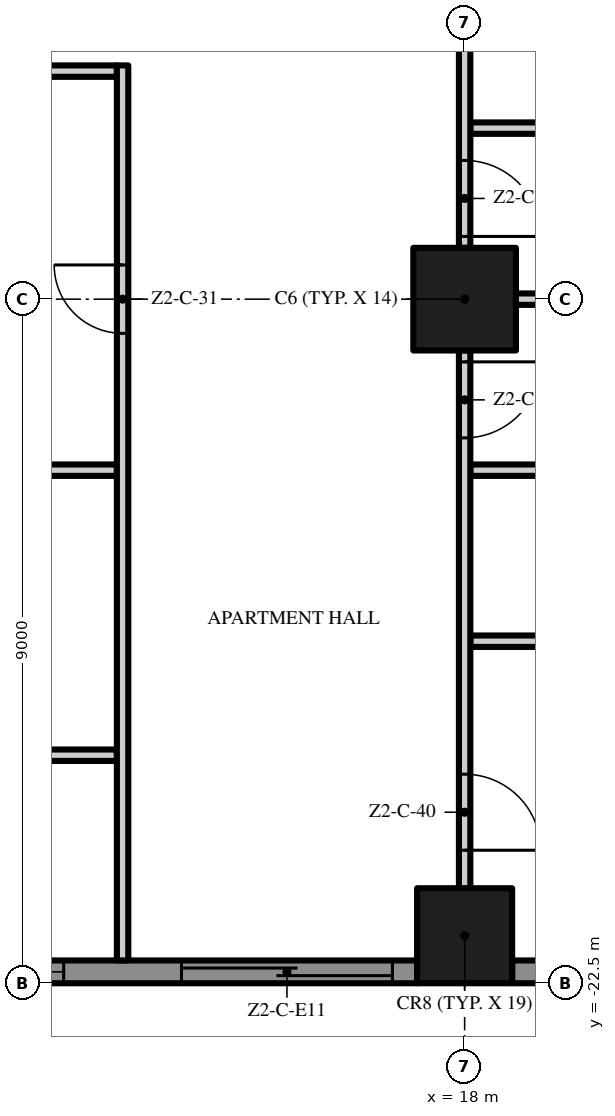
"""IFC4 building model, lengths in metres.
Left out: names, types, materials, properties, quantities, classifications, styles, units other than length and angle.
Written with IfcOpenShell. Run it as: python <this file> out.ifc"""

import sys

from ifc_helpers import new_model, si_unit, direction, frame, frame_2d, origin, origin_2d, place, context, subcontext, project, spatial, polyline, rectangle, outline, extrude, element, fill, save


model = new_model("IFC4")
c1 = context("Model", 3, precision=1e-05, world=origin(), true_north=direction((0.0, 1.0)))
c2 = subcontext(c1, "Body", "Model", "MODEL_VIEW")
j1 = project(units=[si_unit("LENGTHUNIT", "METRE"), si_unit("PLANEANGLEUNIT", "RADIAN")], contexts=[c1])
p1 = place(None, origin())
s1 = spatial("IfcSite", under=j1, at=p1, CompositionType="ELEMENT")
p2 = place(p1, origin())
s2 = spatial("IfcBuilding", under=s1, at=p2, CompositionType="ELEMENT")
p3 = place(p2, frame((0.0, 0.0, 99.8)))
s3 = spatial("IfcBuildingStorey", under=s2, at=p3, CompositionType="ELEMENT", Elevation=99.8)
p4 = place(p3, frame((18.0, -13.5, 0.0), z_axis=(0.0, 0.0, 1.0), x_axis=(1.0, 0.0, 0.0)))
e1 = element("IfcColumn", 1, at=p4, inside=s3, PredefinedType="COLUMN", context=c2, shape_type="SweptSolid", body=[
    extrude(rectangle(XDim=1.35, YDim=1.35, at=origin_2d()), origin(), (0.0, 0.0, 1.0), 3.5),
])
p5 = place(p3, frame((18.0, -21.875, 0.0), z_axis=(0.0, 0.0, 1.0), x_axis=(1.0, 0.0, 0.0)))
e2 = element("IfcColumn", 2, at=p5, inside=s3, PredefinedType="COLUMN", context=c2, shape_type="SweptSolid", body=[
    extrude(rectangle(XDim=1.25, YDim=1.25, at=origin_2d()), origin(), (0.0, 0.0, 1.0), 3.5),
])
p6 = place(p3, frame((17.375, -22.35, 0.0), z_axis=(0.0, 0.0, 1.0), x_axis=(-1.0, 0.0, 0.0)))
e3 = element("IfcWall", 3, at=p6, inside=s3, PredefinedType="SOLIDWALL", context=c2, shape_type="SweptSolid", body=[
    extrude(rectangle(XDim=7.75, YDim=0.3, at=frame_2d((3.875, 0.0))), origin(), (0.0, 0.0, 1.0), 3.5),
])
p7 = place(p6, frame((4.65, 0.0, 0.45)))
e4 = element("IfcOpeningElement", 4, at=p7, cuts=e3, PredefinedType="OPENING", context=c2, shape_type="SweptSolid", body=[
    extrude(rectangle(XDim=2.775, YDim=2.65, at=frame_2d((1.387, 1.325))), frame((0.0, 0.16, 0.0), z_axis=(0.0, -1.0, 0.0), x_axis=(1.0, 0.0, 0.0)), (0.0, 0.0, 1.0), 0.32),
])
p8 = place(p6, frame((0.325, 0.0, 0.0)))
e5 = element("IfcOpeningElement", 5, at=p8, cuts=e3, PredefinedType="OPENING", context=c2, shape_type="SweptSolid", body=[
    extrude(rectangle(XDim=2.775, YDim=2.4, at=frame_2d((1.387, 1.2))), frame((0.0, 0.16, 0.0), z_axis=(0.0, -1.0, 0.0), x_axis=(1.0, 0.0, 0.0)), (0.0, 0.0, 1.0), 0.32),
])
p9 = place(p3, frame((22.5, -22.35, 0.0), z_axis=(0.0, 0.0, 1.0), x_axis=(-1.0, 0.0, 0.0)))
e6 = element("IfcWall", 6, at=p9, inside=s3, PredefinedType="SOLIDWALL", context=c2, shape_type="SweptSolid", body=[
    extrude(rectangle(XDim=3.875, YDim=0.3, at=frame_2d((1.938, 0.0))), origin(), (0.0, 0.0, 1.0), 3.5),
])
p10 = place(p9, frame((0.775, 0.0, 0.45)))
e7 = element("IfcOpeningElement", 7, at=p10, cuts=e6, PredefinedType="OPENING", context=c2, shape_type="SweptSolid", body=[
    extrude(rectangle(XDim=2.775, YDim=2.65, at=frame_2d((1.387, 1.325))), frame((0.0, 0.16, 0.0), z_axis=(0.0, -1.0, 0.0), x_axis=(1.0, 0.0, 0.0)), (0.0, 0.0, 1.0), 0.32),
])
p11 = place(p3, origin())
e8 = element("IfcWall", 8, at=p11, inside=s3, PredefinedType="USERDEFINED", context=c2, shape_type="SweptSolid", body=[
    extrude(outline(polyline([(-22.5, -23.1), (-21.0, -23.329), (-19.5, -23.929), (-18.0, -24.671), (-16.5, -25.271), (-15.0, -25.5), (-13.5, -25.271), (-12.0, -24.671), (-10.5, -23.929), (-9.0, -23.329), (-7.5, -23.1), (-6.0, -23.329), (-4.5, -23.929), (-3.0, -24.671), (-1.5, -25.271), (0.0, -25.5), (1.5, -25.271), (3.0, -24.671), (4.5, -23.929), (6.0, -23.329), (7.5, -23.1), (9.0, -23.329), (10.5, -23.929), (12.0, -24.671), (13.5, -25.271), (15.0, -25.5), (16.5, -25.271), (18.0, -24.671), (19.5, -23.929), (21.0, -23.329), (22.5, -23.1), (22.462, -22.853), (20.934, -23.086), (19.398, -23.701), (17.898, -24.442), (16.434, -25.028), (15.0, -25.247), (13.566, -25.028), (12.102, -24.442), (10.602, -23.701), (9.066, -23.086), (7.5, -22.847), (5.934, -23.086), (4.398, -23.701), (2.898, -24.442), (1.434, -25.028), (0.0, -25.247), (-1.434, -25.028), (-2.898, -24.442), (-4.398, -23.701), (-5.934, -23.086), (-7.5, -22.847), (-9.066, -23.086), (-10.602, -23.701), (-12.102, -24.442), (-13.566, -25.028), (-15.0, -25.247), (-16.434, -25.028), (-17.898, -24.442), (-19.398, -23.701), (-20.934, -23.086), (-22.462, -22.853), (-22.5, -23.1)])), origin(), (0.0, 0.0, 1.0), 0.9),
])
p12 = place(p3, frame((9.075, -19.5, 0.0), z_axis=(0.0, 0.0, 1.0), x_axis=(1.0, 0.0, 0.0)))
e9 = element("IfcWall", 9, at=p12, inside=s3, PredefinedType="PARTITIONING", context=c2, shape_type="SweptSolid", body=[
    extrude(rectangle(XDim=4.35, YDim=0.15, at=frame_2d((2.175, 0.0))), origin(), (0.0, 0.0, 1.0), 3.5),
])
p13 = place(p3, frame((18.075, -18.0, 0.0), z_axis=(0.0, 0.0, 1.0), x_axis=(1.0, 0.0, 0.0)))
e10 = element("IfcWall", 10, at=p13, inside=s3, PredefinedType="PARTITIONING", context=c2, shape_type="SweptSolid", body=[
    extrude(rectangle(XDim=3.8, YDim=0.15, at=frame_2d((1.9, 0.0))), origin(), (0.0, 0.0, 1.0), 3.5),
])
p14 = place(p3, frame((13.425, -15.75, 0.0), z_axis=(0.0, 0.0, 1.0), x_axis=(-1.0, 0.0, 0.0)))
e11 = element("IfcWall", 11, at=p14, inside=s3, PredefinedType="PARTITIONING", context=c2, shape_type="SweptSolid", body=[
    extrude(rectangle(XDim=4.35, YDim=0.15, at=frame_2d((2.175, 0.0))), origin(), (0.0, 0.0, 1.0), 3.5),
])
p15 = place(p14, frame((1.7, 0.0, 0.0)))
e12 = element("IfcOpeningElement", 12, at=p15, cuts=e11, PredefinedType="OPENING", context=c2, shape_type="SweptSolid", body=[
    extrude(rectangle(XDim=0.9, YDim=2.1, at=frame_2d((0.45, 1.05))), frame((0.0, 0.085, 0.0), z_axis=(0.0, -1.0, 0.0), x_axis=(1.0, 0.0, 0.0)), (0.0, 0.0, 1.0), 0.17),
])
p16 = place(p3, frame((18.075, -15.75, 0.0), z_axis=(0.0, 0.0, 1.0), x_axis=(1.0, 0.0, 0.0)))
e13 = element("IfcWall", 13, at=p16, inside=s3, PredefinedType="PARTITIONING", context=c2, shape_type="SweptSolid", body=[
    extrude(rectangle(XDim=2.85, YDim=0.15, at=frame_2d((1.425, 0.0))), origin(), (0.0, 0.0, 1.0), 3.5),
])
p17 = place(p3, frame((18.675, -13.5, 0.0), z_axis=(0.0, 0.0, 1.0), x_axis=(1.0, 0.0, 0.0)))
e14 = element("IfcWall", 14, at=p17, inside=s3, PredefinedType="PARTITIONING", context=c2, shape_type="SweptSolid", body=[
    extrude(rectangle(XDim=7.075, YDim=0.15, at=frame_2d((3.538, 0.0))), origin(), (0.0, 0.0, 1.0), 3.5),
])
p18 = place(p3, frame((18.075, -11.25, 0.0), z_axis=(0.0, 0.0, 1.0), x_axis=(1.0, 0.0, 0.0)))
e15 = element("IfcWall", 15, at=p18, inside=s3, PredefinedType="PARTITIONING", context=c2, shape_type="SweptSolid", body=[
    extrude(rectangle(XDim=2.85, YDim=0.15, at=frame_2d((1.425, 0.0))), origin(), (0.0, 0.0, 1.0), 3.5),
])
p19 = place(p3, frame((9.075, -10.5, 0.0), z_axis=(0.0, 0.0, 1.0), x_axis=(1.0, 0.0, 0.0)))
e16 = element("IfcWall", 16, at=p19, inside=s3, PredefinedType="PARTITIONING", context=c2, shape_type="SweptSolid", body=[
    extrude(rectangle(XDim=4.35, YDim=0.15, at=frame_2d((2.175, 0.0))), origin(), (0.0, 0.0, 1.0), 3.5),
])
p20 = place(p3, frame((13.5, -22.2, 0.0), z_axis=(0.0, 0.0, 1.0), x_axis=(0.0, 1.0, 0.0)))
e17 = element("IfcWall", 17, at=p20, inside=s3, PredefinedType="PARTITIONING", context=c2, shape_type="SweptSolid", body=[
    extrude(rectangle(XDim=11.775, YDim=0.15, at=frame_2d((5.888, 0.0))), origin(), (0.0, 0.0, 1.0), 3.5),
])
p21 = place(p20, frame((8.25, 0.0, 0.0)))
e18 = element("IfcOpeningElement", 18, at=p21, cuts=e17, PredefinedType="OPENING", context=c2, shape_type="SweptSolid", body=[
    extrude(rectangle(XDim=0.9, YDim=2.1, at=frame_2d((0.45, 1.05))), frame((0.0, 0.085, 0.0), z_axis=(0.0, -1.0, 0.0), x_axis=(1.0, 0.0, 0.0)), (0.0, 0.0, 1.0), 0.17),
])
p22 = place(p3, frame((18.0, -14.175, 0.0), z_axis=(0.0, 0.0, 1.0), x_axis=(0.0, -1.0, 0.0)))
e19 = element("IfcWall", 19, at=p22, inside=s3, PredefinedType="PARTITIONING", context=c2, shape_type="SweptSolid", body=[
    extrude(rectangle(XDim=7.075, YDim=0.15, at=frame_2d((3.538, 0.0))), origin(), (0.0, 0.0, 1.0), 3.5),
])
p23 = place(p22, frame((0.15, 0.0, 0.0)))
e20 = element("IfcOpeningElement", 20, at=p23, cuts=e19, PredefinedType="OPENING", context=c2, shape_type="SweptSolid", body=[
    extrude(rectangle(XDim=1.0, YDim=2.4, at=frame_2d((0.5, 1.2))), frame((0.0, 0.085, 0.0), z_axis=(0.0, -1.0, 0.0), x_axis=(1.0, 0.0, 0.0)), (0.0, 0.0, 1.0), 0.17),
])
p24 = place(p22, frame((5.575, 0.0, 0.0)))
e21 = element("IfcOpeningElement", 21, at=p24, cuts=e19, PredefinedType="OPENING", context=c2, shape_type="SweptSolid", body=[
    extrude(rectangle(XDim=1.0, YDim=2.4, at=frame_2d((0.5, 1.2))), frame((0.0, 0.085, 0.0), z_axis=(0.0, -1.0, 0.0), x_axis=(1.0, 0.0, 0.0)), (0.0, 0.0, 1.0), 0.17),
])
p25 = place(p3, frame((18.0, -5.175, 0.0), z_axis=(0.0, 0.0, 1.0), x_axis=(0.0, -1.0, 0.0)))
e22 = element("IfcWall", 22, at=p25, inside=s3, PredefinedType="PARTITIONING", context=c2, shape_type="SweptSolid", body=[
    extrude(rectangle(XDim=7.65, YDim=0.15, at=frame_2d((3.825, 0.0))), origin(), (0.0, 0.0, 1.0), 3.5),
])
p26 = place(p25, frame((0.15, 0.0, 0.0)))
e23 = element("IfcOpeningElement", 23, at=p26, cuts=e22, PredefinedType="OPENING", context=c2, shape_type="SweptSolid", body=[
    extrude(rectangle(XDim=1.8, YDim=2.4, at=frame_2d((0.9, 1.2))), frame((0.0, 0.085, 0.0), z_axis=(0.0, -1.0, 0.0), x_axis=(1.0, 0.0, 0.0)), (0.0, 0.0, 1.0), 0.17),
])
p27 = place(p25, frame((6.5, 0.0, 0.0)))
e24 = element("IfcOpeningElement", 24, at=p27, cuts=e22, PredefinedType="OPENING", context=c2, shape_type="SweptSolid", body=[
    extrude(rectangle(XDim=1.0, YDim=2.4, at=frame_2d((0.5, 1.2))), frame((0.0, 0.085, 0.0), z_axis=(0.0, -1.0, 0.0), x_axis=(1.0, 0.0, 0.0)), (0.0, 0.0, 1.0), 0.17),
])
p28 = place(p7, origin())
e25 = element("IfcWindow", 25, at=p28, inside=s3, PartitioningType="SINGLE_PANEL", PredefinedType="WINDOW", context=c2, shape_type="SweptSolid", body=[
    extrude(rectangle(XDim=2.775, YDim=2.65, at=frame_2d((1.387, 1.325))), frame((0.0, 0.03, 0.0), z_axis=(0.0, -1.0, 0.0), x_axis=(1.0, 0.0, 0.0)), (0.0, 0.0, 1.0), 0.06),
])
fill(e4, e25)
p29 = place(p8, origin())
e26 = element("IfcDoor", 26, at=p29, inside=s3, OperationType="SINGLE_SWING_LEFT", PredefinedType="DOOR", context=c2, shape_type="SweptSolid", body=[
    extrude(rectangle(XDim=2.775, YDim=2.4, at=frame_2d((1.387, 1.2))), frame((0.0, 0.025, 0.0), z_axis=(0.0, -1.0, 0.0), x_axis=(1.0, 0.0, 0.0)), (0.0, 0.0, 1.0), 0.05),
])
fill(e5, e26)
p30 = place(p21, origin())
e27 = element("IfcDoor", 27, at=p30, inside=s3, OperationType="SINGLE_SWING_RIGHT", PredefinedType="DOOR", context=c2, shape_type="SweptSolid", body=[
    extrude(rectangle(XDim=0.9, YDim=2.1, at=frame_2d((0.45, 1.05))), frame((0.0, 0.025, 0.0), z_axis=(0.0, -1.0, 0.0), x_axis=(1.0, 0.0, 0.0)), (0.0, 0.0, 1.0), 0.05),
])
fill(e18, e27)
p31 = place(p27, origin())
e28 = element("IfcDoor", 28, at=p31, inside=s3, OperationType="SINGLE_SWING_RIGHT", PredefinedType="DOOR", context=c2, shape_type="SweptSolid", body=[
    extrude(rectangle(XDim=1.0, YDim=2.4, at=frame_2d((0.5, 1.2))), frame((0.0, 0.025, 0.0), z_axis=(0.0, -1.0, 0.0), x_axis=(1.0, 0.0, 0.0)), (0.0, 0.0, 1.0), 0.05),
])
fill(e24, e28)
p32 = place(p23, origin())
e29 = element("IfcDoor", 29, at=p32, inside=s3, OperationType="SINGLE_SWING_LEFT", PredefinedType="DOOR", context=c2, shape_type="SweptSolid", body=[
    extrude(rectangle(XDim=1.0, YDim=2.4, at=frame_2d((0.5, 1.2))), frame((0.0, 0.025, 0.0), z_axis=(0.0, -1.0, 0.0), x_axis=(1.0, 0.0, 0.0)), (0.0, 0.0, 1.0), 0.05),
])
fill(e20, e29)
p33 = place(p24, origin())
e30 = element("IfcDoor", 30, at=p33, inside=s3, OperationType="SINGLE_SWING_RIGHT", PredefinedType="DOOR", context=c2, shape_type="SweptSolid", body=[
    extrude(rectangle(XDim=1.0, YDim=2.4, at=frame_2d((0.5, 1.2))), frame((0.0, 0.025, 0.0), z_axis=(0.0, -1.0, 0.0), x_axis=(1.0, 0.0, 0.0)), (0.0, 0.0, 1.0), 0.05),
])
fill(e21, e30)
save(model, sys.argv[1])
